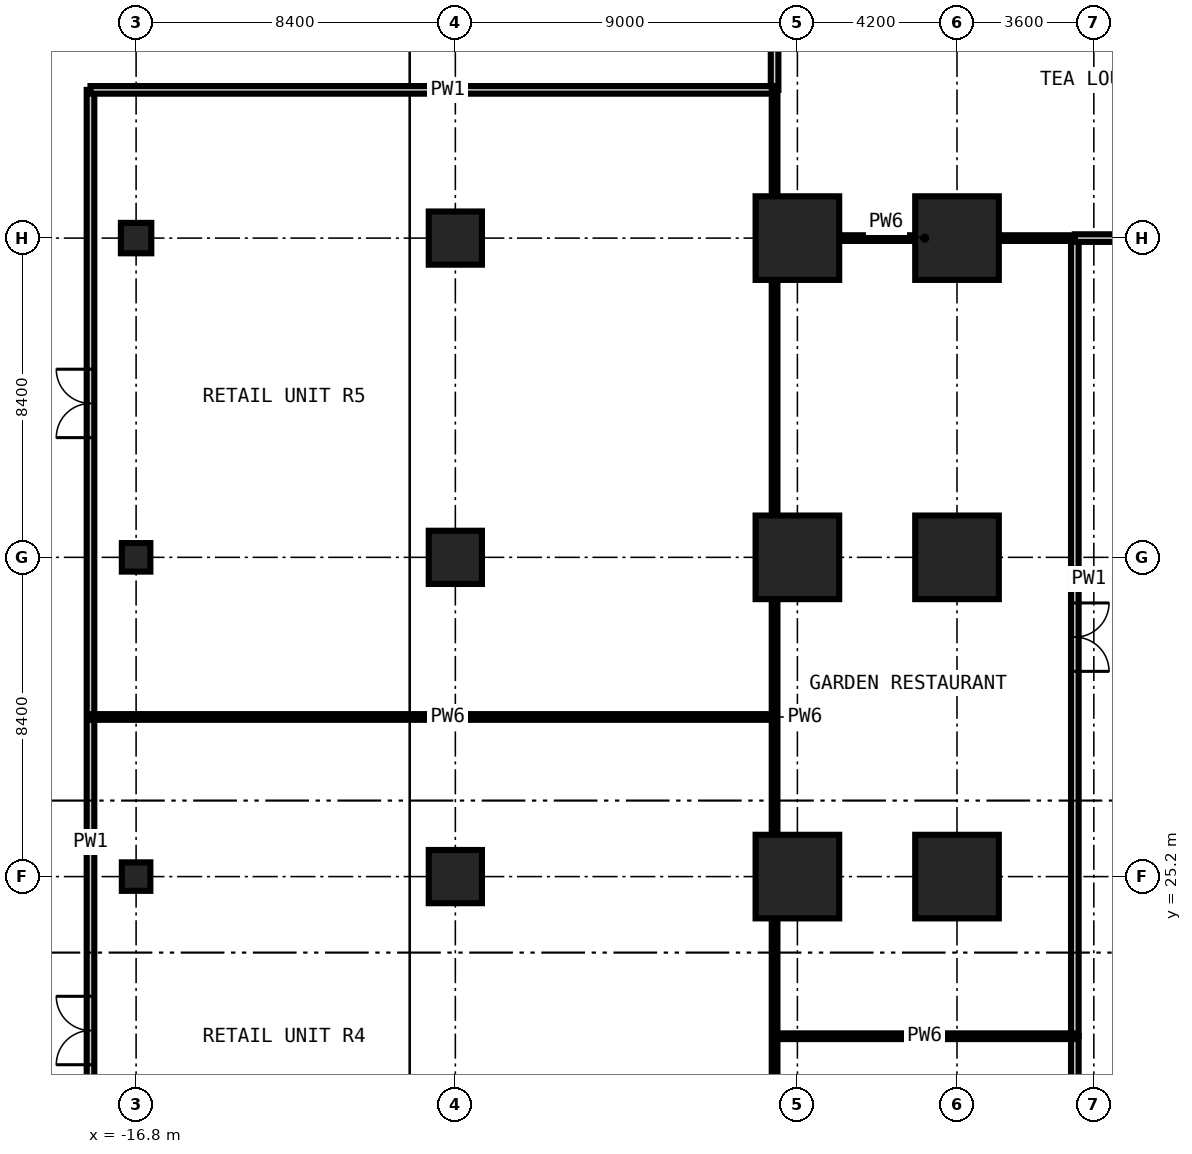
"""IFC4 building model, lengths in metres.
Left out: names, types, materials, properties, quantities, classifications, styles, units other than length and angle.
Written with IfcOpenShell. Run it as: python <this file> out.ifc"""

import sys

from ifc_helpers import new_model, si_unit, direction, frame, frame_2d, origin, origin_2d, place, context, subcontext, project, spatial, rectangle, extrude, element, fill, save


model = new_model("IFC4")
c1 = context("Model", 3, precision=1e-05, world=origin(), true_north=direction((0.0, 1.0)))
c2 = subcontext(c1, "Body", "Model", "MODEL_VIEW")
j1 = project(units=[si_unit("LENGTHUNIT", "METRE"), si_unit("PLANEANGLEUNIT", "RADIAN")], contexts=[c1])
p1 = place(None, origin())
s1 = spatial("IfcSite", under=j1, at=p1, CompositionType="ELEMENT")
p2 = place(p1, origin())
s2 = spatial("IfcBuilding", under=s1, at=p2, CompositionType="ELEMENT")
p3 = place(p2, origin())
s3 = spatial("IfcBuildingStorey", under=s2, at=p3, CompositionType="ELEMENT", Elevation=0.0)
for number, where, z_axis, x_axis in (
    (1, (0.6, 25.2, -0.3), (0.0, 0.0, 1.0), (1.0, 0.0, 0.0)),
    (2, (0.6, 33.6, -0.3), (0.0, 0.0, 1.0), (1.0, 0.0, 0.0)),
    (3, (0.6, 42.0, -0.3), (0.0, 0.0, 1.0), (1.0, 0.0, 0.0)),
    (4, (4.8, 25.2, -0.3), (0.0, 0.0, 1.0), (1.0, 0.0, 0.0)),
    (5, (4.8, 33.6, -0.3), (0.0, 0.0, 1.0), (1.0, 0.0, 0.0)),
    (6, (4.8, 42.0, -0.3), (0.0, 0.0, 1.0), (1.0, 0.0, 0.0)),
):
    element("IfcColumn", number, at=place(p3, frame(where, z_axis=z_axis, x_axis=x_axis)), inside=s3, PredefinedType="COLUMN", context=c2, shape_type="SweptSolid", body=[
        extrude(rectangle(XDim=2.2, YDim=2.2, at=origin_2d()), origin(), (0.0, 0.0, 1.0), 6.0),
    ])
for number, where, z_axis, x_axis in (
    (7, (-16.8, 25.2, -0.5), (0.0, 0.0, 1.0), (1.0, 0.0, 0.0)),
    (8, (-16.8, 33.6, -0.5), (0.0, 0.0, 1.0), (1.0, 0.0, 0.0)),
):
    element("IfcColumn", number, at=place(p3, frame(where, z_axis=z_axis, x_axis=x_axis)), inside=s3, PredefinedType="COLUMN", context=c2, shape_type="SweptSolid", body=[
        extrude(rectangle(XDim=0.75, YDim=0.75, at=origin_2d()), origin(), (0.0, 0.0, 1.0), 6.2),
    ])
p4 = place(p3, frame((-16.8, 42.0, -0.3), z_axis=(0.0, 0.0, 1.0), x_axis=(1.0, 0.0, 0.0)))
e9 = element("IfcColumn", 9, at=p4, inside=s3, PredefinedType="COLUMN", context=c2, shape_type="SweptSolid", body=[
    extrude(rectangle(XDim=0.8, YDim=0.8, at=origin_2d()), origin(), (0.0, 0.0, 1.0), 6.0),
])
for number, where, z_axis, x_axis in (
    (10, (-8.4, 25.2, -0.3), (0.0, 0.0, 1.0), (1.0, 0.0, 0.0)),
    (11, (-8.4, 33.6, -0.3), (0.0, 0.0, 1.0), (1.0, 0.0, 0.0)),
    (12, (-8.4, 42.0, -0.3), (0.0, 0.0, 1.0), (1.0, 0.0, 0.0)),
):
    element("IfcColumn", number, at=place(p3, frame(where, z_axis=z_axis, x_axis=x_axis)), inside=s3, PredefinedType="COLUMN", context=c2, shape_type="SweptSolid", body=[
        extrude(rectangle(XDim=1.4, YDim=1.4, at=origin_2d()), origin(), (0.0, 0.0, 1.0), 6.0),
    ])
p5 = place(p3, frame((-18.0, 6.3, 0.0), z_axis=(0.0, 0.0, 1.0), x_axis=(0.0, 1.0, 0.0)))
e13 = element("IfcWall", 13, at=p5, inside=s3, PredefinedType="PARTITIONING", context=c2, shape_type="SweptSolid", body=[
    extrude(rectangle(XDim=39.6, YDim=0.2, at=frame_2d((19.8, 0.0))), origin(), (0.0, 0.0, 1.0), 5.7),
])
p6 = place(p5, frame((13.95, 0.0, 0.0)))
e14 = element("IfcOpeningElement", 14, at=p6, cuts=e13, PredefinedType="OPENING", context=c2, shape_type="SweptSolid", body=[
    extrude(rectangle(XDim=1.8, YDim=2.7, at=frame_2d((0.9, 1.35))), frame((0.0, 0.11, 0.0), z_axis=(0.0, -1.0, 0.0), x_axis=(1.0, 0.0, 0.0)), (0.0, 0.0, 1.0), 0.22),
])
p7 = place(p5, frame((30.45, 0.0, 0.0)))
e15 = element("IfcOpeningElement", 15, at=p7, cuts=e13, PredefinedType="OPENING", context=c2, shape_type="SweptSolid", body=[
    extrude(rectangle(XDim=1.8, YDim=2.7, at=frame_2d((0.9, 1.35))), frame((0.0, 0.11, 0.0), z_axis=(0.0, -1.0, 0.0), x_axis=(1.0, 0.0, 0.0)), (0.0, 0.0, 1.0), 0.22),
])
p8 = place(p5, frame((2.5, 0.0, 0.0)))
e16 = element("IfcOpeningElement", 16, at=p8, cuts=e13, PredefinedType="OPENING", context=c2, shape_type="SweptSolid", body=[
    extrude(rectangle(XDim=1.8, YDim=2.7, at=frame_2d((0.9, 1.35))), frame((0.0, 0.11, 0.0), z_axis=(0.0, -1.0, 0.0), x_axis=(1.0, 0.0, 0.0)), (0.0, 0.0, 1.0), 0.22),
])
p9 = place(p3, frame((0.0, 45.9, 0.0), z_axis=(0.0, 0.0, 1.0), x_axis=(0.0, 1.0, 0.0)))
e17 = element("IfcWall", 17, at=p9, inside=s3, PredefinedType="PARTITIONING", context=c2, shape_type="SweptSolid", body=[
    extrude(rectangle(XDim=12.9, YDim=0.2, at=frame_2d((6.45, 0.0))), origin(), (0.0, 0.0, 1.0), 5.7),
])
p10 = place(p3, frame((7.9, 12.6, 0.0), z_axis=(0.0, 0.0, 1.0), x_axis=(0.0, 1.0, 0.0)))
e18 = element("IfcWall", 18, at=p10, inside=s3, PredefinedType="PARTITIONING", context=c2, shape_type="SweptSolid", body=[
    extrude(rectangle(XDim=8.4, YDim=0.2, at=frame_2d((4.2, 0.0))), origin(), (0.0, 0.0, 1.0), 5.7),
])
p11 = place(p10, frame((3.3, 0.0, 0.0)))
e19 = element("IfcOpeningElement", 19, at=p11, cuts=e18, PredefinedType="OPENING", context=c2, shape_type="SweptSolid", body=[
    extrude(rectangle(XDim=1.8, YDim=2.4, at=frame_2d((0.9, 1.2))), frame((0.0, 0.11, 0.0), z_axis=(0.0, -1.0, 0.0), x_axis=(1.0, 0.0, 0.0)), (0.0, 0.0, 1.0), 0.22),
])
p12 = place(p3, frame((-18.0, 45.9, 0.0), z_axis=(0.0, 0.0, 1.0), x_axis=(1.0, 0.0, 0.0)))
e20 = element("IfcWall", 20, at=p12, inside=s3, PredefinedType="PARTITIONING", context=c2, shape_type="SweptSolid", body=[
    extrude(rectangle(XDim=18.0, YDim=0.2, at=frame_2d((9.0, 0.0))), origin(), (0.0, 0.0, 1.0), 5.7),
])
p13 = place(p3, frame((7.9, 42.0, 0.0), z_axis=(0.0, 0.0, 1.0), x_axis=(0.0, -1.0, 0.0)))
e21 = element("IfcWall", 21, at=p13, inside=s3, PredefinedType="PARTITIONING", context=c2, shape_type="SweptSolid", body=[
    extrude(rectangle(XDim=21.0, YDim=0.2, at=frame_2d((10.5, 0.0))), origin(), (0.0, 0.0, 1.0), 5.7),
])
p14 = place(p13, frame((9.6, 0.0, 0.0)))
e22 = element("IfcOpeningElement", 22, at=p14, cuts=e21, PredefinedType="OPENING", context=c2, shape_type="SweptSolid", body=[
    extrude(rectangle(XDim=1.8, YDim=2.4, at=frame_2d((0.9, 1.2))), frame((0.0, 0.11, 0.0), z_axis=(0.0, -1.0, 0.0), x_axis=(1.0, 0.0, 0.0)), (0.0, 0.0, 1.0), 0.22),
])
p15 = place(p3, frame((12.1, 42.0, 0.0), z_axis=(0.0, 0.0, 1.0), x_axis=(-1.0, 0.0, 0.0)))
e23 = element("IfcWall", 23, at=p15, inside=s3, PredefinedType="PARTITIONING", context=c2, shape_type="SweptSolid", body=[
    extrude(rectangle(XDim=4.2, YDim=0.2, at=frame_2d((2.1, 0.0))), origin(), (0.0, 0.0, 1.0), 5.7),
])
p16 = place(p3, frame((0.0, 12.9, 0.0), z_axis=(0.0, 0.0, 1.0), x_axis=(0.0, 1.0, 0.0)))
e24 = element("IfcWall", 24, at=p16, inside=s3, PredefinedType="PARTITIONING", context=c2, shape_type="SweptSolid", body=[
    extrude(rectangle(XDim=33.0, YDim=0.15, at=frame_2d((16.5, 0.0))), origin(), (0.0, 0.0, 1.0), 5.7),
])
p17 = place(p3, frame((0.0, 21.0, 0.0), z_axis=(0.0, 0.0, 1.0), x_axis=(1.0, 0.0, 0.0)))
e25 = element("IfcWall", 25, at=p17, inside=s3, PredefinedType="PARTITIONING", context=c2, shape_type="SweptSolid", body=[
    extrude(rectangle(XDim=7.9, YDim=0.15, at=frame_2d((3.95, 0.0))), origin(), (0.0, 0.0, 1.0), 5.7),
])
p18 = place(p3, frame((-18.0, 29.4, 0.0), z_axis=(0.0, 0.0, 1.0), x_axis=(1.0, 0.0, 0.0)))
e26 = element("IfcWall", 26, at=p18, inside=s3, PredefinedType="PARTITIONING", context=c2, shape_type="SweptSolid", body=[
    extrude(rectangle(XDim=18.0, YDim=0.15, at=frame_2d((9.0, 0.0))), origin(), (0.0, 0.0, 1.0), 5.7),
])
p19 = place(p3, frame((0.0, 42.0, 0.0), z_axis=(0.0, 0.0, 1.0), x_axis=(1.0, 0.0, 0.0)))
e27 = element("IfcWall", 27, at=p19, inside=s3, PredefinedType="PARTITIONING", context=c2, shape_type="SweptSolid", body=[
    extrude(rectangle(XDim=7.9, YDim=0.15, at=frame_2d((3.95, 0.0))), origin(), (0.0, 0.0, 1.0), 5.7),
])
p20 = place(p6, origin())
e28 = element("IfcDoor", 28, at=p20, inside=s3, OperationType="DOUBLE_DOOR_DOUBLE_SWING", PredefinedType="DOOR", context=c2, shape_type="SweptSolid", body=[
    extrude(rectangle(XDim=1.8, YDim=2.7, at=frame_2d((0.9, 1.35))), frame((0.0, 0.025, 0.0), z_axis=(0.0, -1.0, 0.0), x_axis=(1.0, 0.0, 0.0)), (0.0, 0.0, 1.0), 0.05),
])
fill(e14, e28)
p21 = place(p7, origin())
e29 = element("IfcDoor", 29, at=p21, inside=s3, OperationType="DOUBLE_DOOR_DOUBLE_SWING", PredefinedType="DOOR", context=c2, shape_type="SweptSolid", body=[
    extrude(rectangle(XDim=1.8, YDim=2.7, at=frame_2d((0.9, 1.35))), frame((0.0, 0.025, 0.0), z_axis=(0.0, -1.0, 0.0), x_axis=(1.0, 0.0, 0.0)), (0.0, 0.0, 1.0), 0.05),
])
fill(e15, e29)
p22 = place(p14, origin())
e30 = element("IfcDoor", 30, at=p22, inside=s3, OperationType="DOUBLE_DOOR_DOUBLE_SWING", PredefinedType="DOOR", context=c2, shape_type="SweptSolid", body=[
    extrude(rectangle(XDim=1.8, YDim=2.4, at=frame_2d((0.9, 1.2))), frame((0.0, 0.025, 0.0), z_axis=(0.0, -1.0, 0.0), x_axis=(1.0, 0.0, 0.0)), (0.0, 0.0, 1.0), 0.05),
])
fill(e22, e30)
save(model, sys.argv[1])
